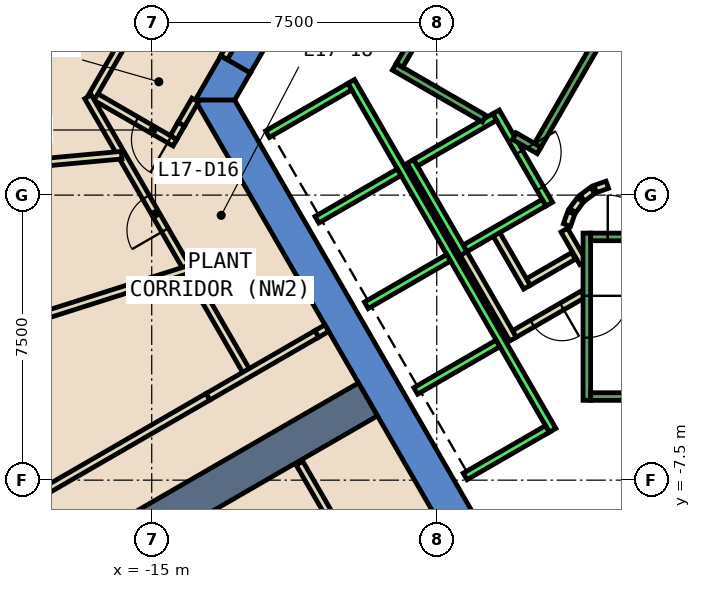
"""IFC4 building model, lengths in metres.
Left out: names, types, materials, properties, quantities, classifications, styles, units other than length and angle.
Written with IfcOpenShell. Run it as: python <this file> out.ifc"""

import sys

from ifc_helpers import new_model, si_unit, direction, frame, frame_2d, origin, place, context, subcontext, project, spatial, polyline, rectangle, outline, extrude, element, fill, save


model = new_model("IFC4")
c1 = context("Model", 3, precision=1e-05, world=origin(), true_north=direction((0.0, 1.0)))
c2 = subcontext(c1, "Body", "Model", "MODEL_VIEW")
j1 = project(units=[si_unit("LENGTHUNIT", "METRE"), si_unit("PLANEANGLEUNIT", "RADIAN")], contexts=[c1])
p1 = place(None, origin())
s1 = spatial("IfcSite", under=j1, at=p1, CompositionType="ELEMENT")
p2 = place(p1, origin())
s2 = spatial("IfcBuilding", under=s1, at=p2, CompositionType="ELEMENT")
p3 = place(p2, frame((0.0, 0.0, 81.2)))
s3 = spatial("IfcBuildingStorey", under=s2, at=p3, CompositionType="ELEMENT", Elevation=81.2)
p4 = place(p3, frame((0.0, 0.0, -0.6)))
e1 = element("IfcWall", 1, at=p4, inside=s3, PredefinedType="SHEAR", context=c2, shape_type="SweptSolid", body=[
    extrude(outline(polyline([(-12.403, 3.217), (-13.182, 3.667), (-13.856, 2.5), (-12.817, 2.5), (-12.403, 3.217)])), origin(), (0.0, 0.0, 1.0), 5.4),
])
p5 = place(p3, frame((0.0, 0.0, 3.6)))
e2 = element("IfcWall", 2, at=p5, inside=s3, PredefinedType="SHEAR", context=c2, shape_type="SweptSolid", body=[
    extrude(outline(polyline([(-13.182, 3.667), (-12.403, 3.217), (-11.488, 4.802), (-12.267, 5.252), (-13.182, 3.667)])), origin(), (0.0, 0.0, 1.0), 1.2),
])
p6 = place(p3, frame((0.0, 0.0, -0.6)))
e3 = element("IfcWall", 3, at=p6, inside=s3, PredefinedType="SHEAR", context=c2, shape_type="SweptSolid", body=[
    extrude(outline(polyline([(-13.856, 2.5), (-6.928, -9.5), (-6.409, -8.6), (-12.817, 2.5), (-13.856, 2.5)])), origin(), (0.0, 0.0, 1.0), 5.4),
])
p7 = place(p3, frame((-9.31, -5.375, 0.0), z_axis=(0.0, 0.0, 1.0), x_axis=(-0.866022967049, -0.500004220526, 0.0)))
e4 = element("IfcWall", 4, at=p7, inside=s3, PredefinedType="SHEAR", context=c2, shape_type="SweptSolid", body=[
    extrude(rectangle(XDim=35.802, YDim=1.0, at=frame_2d((17.901, 0.0))), origin(), (0.0, 0.0, 1.0), 4.8),
])
p8 = place(p3, frame((-3.9, -1.599, 0.0), z_axis=(0.0, 0.0, 1.0), x_axis=(-0.865969445389, -0.500096910261, 0.0)))
e5 = element("IfcWall", 5, at=p8, inside=s3, PredefinedType="PARTITIONING", context=c2, shape_type="SweptSolid", body=[
    extrude(rectangle(XDim=1.373, YDim=0.2, at=frame_2d((0.687, 0.0))), origin(), (0.0, 0.0, 1.0), 4.8),
])
p9 = place(p3, frame((-5.126, -2.422, 0.0), z_axis=(0.0, 0.0, 1.0), x_axis=(-0.500062241894, 0.865989465428, 0.0)))
e6 = element("IfcWall", 6, at=p9, inside=s3, PredefinedType="PARTITIONING", context=c2, shape_type="SweptSolid", body=[
    extrude(rectangle(XDim=1.7, YDim=0.2, at=frame_2d((0.85, 0.0))), origin(), (0.0, 0.0, 1.0), 4.8),
])
p10 = place(p3, frame((-5.492, -3.788, 0.0), z_axis=(0.0, 0.0, 1.0), x_axis=(-0.500008949224, 0.866020236886, 0.0)))
e7 = element("IfcWall", 7, at=p10, inside=s3, PredefinedType="PARTITIONING", context=c2, shape_type="SweptSolid", body=[
    extrude(rectangle(XDim=2.68, YDim=0.2, at=frame_2d((1.34, 0.0))), origin(), (0.0, 0.0, 1.0), 4.8),
])
p11 = place(p3, frame((-4.145, -0.92, 0.0), z_axis=(0.0, 0.0, 1.0), x_axis=(0.499743786207, -0.866173278362, 0.0)))
e8 = element("IfcWall", 8, at=p11, inside=s3, PredefinedType="PARTITIONING", context=c2, shape_type="SweptSolid", body=[
    extrude(rectangle(XDim=0.991, YDim=0.2, at=frame_2d((0.495, 0.0))), origin(), (0.0, 0.0, 1.0), 4.8),
])
p12 = place(p3, frame((-3.65, -2.61, 0.0), z_axis=(0.0, 0.0, 1.0), x_axis=(-0.866072462134, -0.499918483688, 0.0)))
e9 = element("IfcWall", 9, at=p12, inside=s3, PredefinedType="PARTITIONING", context=c2, shape_type="SweptSolid", body=[
    extrude(rectangle(XDim=2.084, YDim=0.2, at=frame_2d((1.042, 0.0))), origin(), (0.0, 0.0, 1.0), 4.8),
])
p13 = place(p12, frame((0.642, 0.0, 0.0)))
e10 = element("IfcOpeningElement", 10, at=p13, cuts=e9, PredefinedType="OPENING", context=c2, shape_type="SweptSolid", body=[
    extrude(rectangle(XDim=0.9, YDim=2.1, at=frame_2d((0.45, 1.05))), frame((0.0, 0.11, 0.0), z_axis=(0.0, -1.0, 0.0), x_axis=(1.0, 0.0, 0.0)), (0.0, 0.0, 1.0), 0.22),
])
p14 = place(p3, frame((-3.012, 0.273, 0.0), z_axis=(0.0, 0.0, 1.0), x_axis=(-0.942280615813, -0.334824194261, 0.0)))
e11 = element("IfcWall", 11, at=p14, inside=s3, PredefinedType="PARTITIONING", context=c2, shape_type="SweptSolid", body=[
    extrude(rectangle(XDim=0.338, YDim=0.2, at=frame_2d((0.169, 0.0))), origin(), (0.0, 0.0, 1.0), 4.8),
])
p15 = place(p3, frame((-3.397, 0.124, 0.0), z_axis=(0.0, 0.0, 1.0), x_axis=(-0.804311165252, -0.594208338422, 0.0)))
e12 = element("IfcWall", 12, at=p15, inside=s3, PredefinedType="PARTITIONING", context=c2, shape_type="SweptSolid", body=[
    extrude(rectangle(XDim=0.338, YDim=0.2, at=frame_2d((0.169, 0.0))), origin(), (0.0, 0.0, 1.0), 4.8),
])
p16 = place(p3, frame((-3.723, -0.131, 0.0), z_axis=(0.0, 0.0, 1.0), x_axis=(-0.594675113454, -0.803966112121, 0.0)))
e13 = element("IfcWall", 13, at=p16, inside=s3, PredefinedType="PARTITIONING", context=c2, shape_type="SweptSolid", body=[
    extrude(rectangle(XDim=0.338, YDim=0.2, at=frame_2d((0.169, 0.0))), origin(), (0.0, 0.0, 1.0), 4.8),
])
p17 = place(p3, frame((-3.96, -0.47, 0.0), z_axis=(0.0, 0.0, 1.0), x_axis=(-0.334824194261, -0.942280615813, 0.0)))
e14 = element("IfcWall", 14, at=p17, inside=s3, PredefinedType="PARTITIONING", context=c2, shape_type="SweptSolid", body=[
    extrude(rectangle(XDim=0.338, YDim=0.2, at=frame_2d((0.169, 0.0))), origin(), (0.0, 0.0, 1.0), 4.8),
])
p18 = place(p3, frame((-2.771, 4.7, 0.0), z_axis=(0.0, 0.0, 1.0), x_axis=(0.499969479948, -0.866043023828, 0.0)))
e15 = element("IfcWall", 15, at=p18, inside=s3, PredefinedType="PARTITIONING", context=c2, shape_type="SweptSolid", body=[
    extrude(rectangle(XDim=4.99, YDim=0.2, at=frame_2d((2.495, 0.0))), origin(), (0.0, 0.0, 1.0), 4.8),
])
p19 = place(p18, frame((1.945, 0.0, 0.0)))
e16 = element("IfcOpeningElement", 16, at=p19, cuts=e15, PredefinedType="OPENING", context=c2, shape_type="SweptSolid", body=[
    extrude(rectangle(XDim=1.0, YDim=2.1, at=frame_2d((0.5, 1.05))), frame((0.0, 0.11, 0.0), z_axis=(0.0, -1.0, 0.0), x_axis=(1.0, 0.0, 0.0)), (0.0, 0.0, 1.0), 0.22),
])
p20 = place(p3, frame((-8.264, -11.987, 0.0), z_axis=(0.0, 0.0, 1.0), x_axis=(-0.499907863044, 0.866078592546, 0.0)))
e17 = element("IfcWall", 17, at=p20, inside=s3, PredefinedType="PARTITIONING", context=c2, shape_type="SweptSolid", body=[
    extrude(rectangle(XDim=5.699, YDim=0.2, at=frame_2d((2.85, 0.0))), origin(), (0.0, 0.0, 1.0), 4.8),
])
p21 = place(p20, frame((1.419, 0.0, 0.0)))
e18 = element("IfcOpeningElement", 18, at=p21, cuts=e17, PredefinedType="OPENING", context=c2, shape_type="SweptSolid", body=[
    extrude(rectangle(XDim=1.0, YDim=2.1, at=frame_2d((0.5, 1.05))), frame((0.0, 0.11, 0.0), z_axis=(0.0, -1.0, 0.0), x_axis=(1.0, 0.0, 0.0)), (0.0, 0.0, 1.0), 0.22),
])
p22 = place(p3, frame((-10.392, -3.5, 0.0), z_axis=(0.0, 0.0, 1.0), x_axis=(-0.866040446274, -0.499973944738, 0.0)))
e19 = element("IfcWall", 19, at=p22, inside=s3, PredefinedType="PARTITIONING", context=c2, shape_type="SweptSolid", body=[
    extrude(rectangle(XDim=0.308, YDim=0.2, at=frame_2d((0.154, 0.0))), origin(), (0.0, 0.0, 1.0), 1.7),
])
p23 = place(p3, frame((-43.337, -22.52, 0.0), z_axis=(0.0, 0.0, 1.0), x_axis=(0.866035864772, 0.4999818806, 0.0)))
e20 = element("IfcWall", 20, at=p23, inside=s3, PredefinedType="PARTITIONING", context=c2, shape_type="SweptSolid", body=[
    extrude(rectangle(XDim=34.431, YDim=0.2, at=frame_2d((17.216, 0.0))), origin(), (0.0, 0.0, 1.0), 4.8),
])
p24 = place(p3, frame((-13.856, 2.501, 0.0), z_axis=(0.0, 0.0, 1.0), x_axis=(-0.500327511442, -0.865836232376, 0.0)))
e21 = element("IfcWall", 21, at=p24, inside=s3, PredefinedType="PARTITIONING", context=c2, shape_type="SweptSolid", body=[
    extrude(rectangle(XDim=0.733, YDim=0.2, at=frame_2d((0.367, 0.0))), origin(), (0.0, 0.0, 1.0), 4.8),
])
p25 = place(p3, frame((-14.388, 1.379, 0.0), z_axis=(0.0, 0.0, 1.0), x_axis=(-0.866022959057, 0.500004234368, 0.0)))
e22 = element("IfcWall", 22, at=p25, inside=s3, PredefinedType="PARTITIONING", context=c2, shape_type="SweptSolid", body=[
    extrude(rectangle(XDim=2.5, YDim=0.2, at=frame_2d((1.25, 0.0))), origin(), (0.0, 0.0, 1.0), 4.8),
])
p26 = place(p25, frame((0.168, 0.0, 0.0)))
e23 = element("IfcOpeningElement", 23, at=p26, cuts=e22, PredefinedType="OPENING", context=c2, shape_type="SweptSolid", body=[
    extrude(rectangle(XDim=1.0, YDim=2.1, at=frame_2d((0.5, 1.05))), frame((0.0, 0.11, 0.0), z_axis=(0.0, -1.0, 0.0), x_axis=(1.0, 0.0, 0.0)), (0.0, 0.0, 1.0), 0.22),
])
p27 = place(p3, frame((-16.603, 2.542, 0.0), z_axis=(0.0, 0.0, 1.0), x_axis=(0.499968011863, 0.866043871356, 0.0)))
e24 = element("IfcWall", 24, at=p27, inside=s3, PredefinedType="PARTITIONING", context=c2, shape_type="SweptSolid", body=[
    extrude(rectangle(XDim=7.201, YDim=0.2, at=frame_2d((3.6, 0.0))), origin(), (0.0, 0.0, 1.0), 4.8),
])
p28 = place(p27, frame((2.654, 0.0, 0.0)))
e25 = element("IfcOpeningElement", 25, at=p28, cuts=e24, PredefinedType="OPENING", context=c2, shape_type="SweptSolid", body=[
    extrude(rectangle(XDim=1.0, YDim=2.1, at=frame_2d((0.5, 1.05))), frame((0.0, 0.11, 0.0), z_axis=(0.0, -1.0, 0.0), x_axis=(1.0, 0.0, 0.0)), (0.0, 0.0, 1.0), 0.22),
])
p29 = place(p3, frame((-12.471, -4.7, 0.0), z_axis=(0.0, 0.0, 1.0), x_axis=(-0.49990916997, 0.866077838176, 0.0)))
e26 = element("IfcWall", 26, at=p29, inside=s3, PredefinedType="PARTITIONING", context=c2, shape_type="SweptSolid", body=[
    extrude(rectangle(XDim=8.414, YDim=0.2, at=frame_2d((4.207, 0.0))), origin(), (0.0, 0.0, 1.0), 4.8),
])
p30 = place(p29, frame((4.362, 0.0, 0.0)))
e27 = element("IfcOpeningElement", 27, at=p30, cuts=e26, PredefinedType="OPENING", context=c2, shape_type="SweptSolid", body=[
    extrude(rectangle(XDim=1.0, YDim=2.1, at=frame_2d((0.5, 1.05))), frame((0.0, 0.11, 0.0), z_axis=(0.0, -1.0, 0.0), x_axis=(1.0, 0.0, 0.0)), (0.0, 0.0, 1.0), 0.22),
])
p31 = place(p3, frame((-15.791, 1.051, 0.0), z_axis=(0.0, 0.0, 1.0), x_axis=(-0.99580964223, -0.091450294928, 0.0)))
e28 = element("IfcWall", 28, at=p31, inside=s3, PredefinedType="PARTITIONING", context=c2, shape_type="SweptSolid", body=[
    extrude(rectangle(XDim=18.557, YDim=0.2, at=frame_2d((9.278, 0.0))), origin(), (0.0, 0.0, 1.0), 2.4),
])
p32 = place(p3, frame((-14.051, -1.963, 0.0), z_axis=(0.0, 0.0, 1.0), x_axis=(-0.953071002878, -0.302746863687, 0.0)))
e29 = element("IfcWall", 29, at=p32, inside=s3, PredefinedType="PARTITIONING", context=c2, shape_type="SweptSolid", body=[
    extrude(rectangle(XDim=27.158, YDim=0.2, at=frame_2d((13.579, 0.0))), origin(), (0.0, 0.0, 1.0), 4.8),
])
p33 = place(p32, frame((13.05, 0.0, 0.0)))
e30 = element("IfcOpeningElement", 30, at=p33, cuts=e29, PredefinedType="OPENING", context=c2, shape_type="SweptSolid", body=[
    extrude(rectangle(XDim=1.0, YDim=2.1, at=frame_2d((0.5, 1.05))), frame((0.0, 0.11, 0.0), z_axis=(0.0, -1.0, 0.0), x_axis=(1.0, 0.0, 0.0)), (0.0, 0.0, 1.0), 0.22),
])
p34 = place(p3, frame((-12.181, 5.202, 0.0), z_axis=(0.0, 0.0, 1.0), x_axis=(-0.500215337403, -0.865901042976, 0.0)))
e31 = element("IfcWall", 31, at=p34, inside=s3, PredefinedType="PARTITIONING", context=c2, shape_type="SweptSolid", body=[
    extrude(rectangle(XDim=1.829, YDim=0.2, at=frame_2d((0.915, 0.0))), origin(), (0.0, 0.0, 1.0), 2.4),
])
p35 = place(p34, frame((0.415, 0.0, 0.0)))
e32 = element("IfcOpeningElement", 32, at=p35, cuts=e31, PredefinedType="OPENING", context=c2, shape_type="SweptSolid", body=[
    extrude(rectangle(XDim=1.0, YDim=2.1, at=frame_2d((0.5, 1.05))), frame((0.0, 0.11, 0.0), z_axis=(0.0, -1.0, 0.0), x_axis=(1.0, 0.0, 0.0)), (0.0, 0.0, 1.0), 0.22),
])
p36 = place(p3, frame((-10.659, -3.654, 0.0), z_axis=(0.0, 0.0, 1.0), x_axis=(-0.866004557827, -0.500036104519, 0.0)))
e33 = element("IfcWall", 33, at=p36, inside=s3, PredefinedType="PARTITIONING", context=c2, shape_type="SweptSolid", body=[
    extrude(rectangle(XDim=3.302, YDim=0.2, at=frame_2d((1.651, 0.0))), origin(), (0.0, 0.0, 1.0), 4.8),
])
p37 = place(p3, frame((-14.223, 1.866, 0.0), z_axis=(0.0, 0.0, 1.0), x_axis=(-0.500297731093, -0.865853440406, 0.0)))
e34 = element("IfcWall", 34, at=p37, inside=s3, PredefinedType="PARTITIONING", context=c2, shape_type="SweptSolid", body=[
    extrude(rectangle(XDim=0.404, YDim=0.2, at=frame_2d((0.202, 0.0))), origin(), (0.0, 0.0, 1.0), 2.4),
])
p38 = place(p3, frame((-5.94, 2.188, 0.0), z_axis=(0.0, 0.0, 1.0), x_axis=(0.49994636267, -0.866056369097, 0.0)))
e35 = element("IfcWall", 35, at=p38, inside=s3, PredefinedType="STANDARD", context=c2, shape_type="SweptSolid", body=[
    extrude(rectangle(XDim=2.8, YDim=0.2, at=frame_2d((1.4, 0.0))), origin(), (0.0, 0.0, 1.0), 4.8),
])
p39 = place(p38, frame((1.225, 0.0, 0.0)))
e36 = element("IfcOpeningElement", 36, at=p39, cuts=e35, PredefinedType="OPENING", context=c2, shape_type="SweptSolid", body=[
    extrude(rectangle(XDim=1.1, YDim=2.1, at=frame_2d((0.55, 1.05))), frame((0.0, 0.11, 0.0), z_axis=(0.0, -1.0, 0.0), x_axis=(1.0, 0.0, 0.0)), (0.0, 0.0, 1.0), 0.22),
])
p40 = place(p3, frame((-8.192, 0.888, 0.0), z_axis=(0.0, 0.0, 1.0), x_axis=(0.49994636267, -0.866056369097, 0.0)))
e37 = element("IfcWall", 37, at=p40, inside=s3, PredefinedType="STANDARD", context=c2, shape_type="SweptSolid", body=[
    extrude(rectangle(XDim=2.8, YDim=0.2, at=frame_2d((1.4, 0.0))), origin(), (0.0, 0.0, 1.0), 4.8),
])
for number, where, z_axis, x_axis in (
    (38, (-5.977, 2.052, 0.0), (0.0, 0.0, 1.0), (-0.866, -0.5, 0.0)),
    (39, (-4.677, -0.2, 0.0), (0.0, 0.0, 1.0), (-0.866, -0.5, 0.0)),
):
    element("IfcWall", number, at=place(p3, frame(where, z_axis=z_axis, x_axis=x_axis)), inside=s3, PredefinedType="STANDARD", context=c2, shape_type="SweptSolid", body=[
        extrude(rectangle(XDim=2.399, YDim=0.2, at=frame_2d((1.2, 0.0))), origin(), (0.0, 0.0, 1.0), 4.8),
    ])
p41 = place(p3, frame((-9.751, 2.99, 0.0), z_axis=(0.0, 0.0, 1.0), x_axis=(0.50000090737, -0.866024879913, 0.0)))
e40 = element("IfcWall", 40, at=p41, inside=s3, PredefinedType="STANDARD", context=c2, shape_type="SweptSolid", body=[
    extrude(rectangle(XDim=10.6, YDim=0.2, at=frame_2d((5.3, 0.0))), origin(), (0.0, 0.0, 1.0), 4.8),
])
p42 = place(p3, frame((-9.788, 2.853, 0.0), z_axis=(0.0, 0.0, 1.0), x_axis=(-0.865998541277, -0.500046524342, 0.0)))
e41 = element("IfcWall", 41, at=p42, inside=s3, PredefinedType="STANDARD", context=c2, shape_type="SweptSolid", body=[
    extrude(rectangle(XDim=2.5, YDim=0.2, at=frame_2d((1.25, 0.0))), origin(), (0.0, 0.0, 1.0), 4.8),
])
for number, where, z_axis, x_axis in (
    (42, (-8.488, 0.602, 0.0), (0.0, 0.0, 1.0), (-0.866, -0.5, 0.0)),
    (43, (-7.188, -1.65, 0.0), (0.0, 0.0, 1.0), (-0.866, -0.5, 0.0)),
    (44, (-5.888, -3.902, 0.0), (0.0, 0.0, 1.0), (-0.866, -0.5, 0.0)),
    (45, (-4.588, -6.153, 0.0), (0.0, 0.0, 1.0), (-0.866, -0.5, 0.0)),
):
    element("IfcWall", number, at=place(p3, frame(where, z_axis=z_axis, x_axis=x_axis)), inside=s3, PredefinedType="STANDARD", context=c2, shape_type="SweptSolid", body=[
        extrude(rectangle(XDim=2.5, YDim=0.2, at=frame_2d((1.25, 0.0))), origin(), (0.0, 0.0, 1.0), 4.8),
    ])
p43 = place(p3, frame((-3.55, -1.0, 0.0), z_axis=(0.0, 0.0, 1.0), x_axis=(0.0, -1.0, 0.0)))
e46 = element("IfcWall", 46, at=p43, inside=s3, PredefinedType="STANDARD", context=c2, shape_type="SweptSolid", body=[
    extrude(rectangle(XDim=4.4, YDim=0.2, at=frame_2d((2.2, 0.0))), origin(), (0.0, 0.0, 1.0), 4.8),
])
p44 = place(p43, frame((1.65, 0.0, 0.0)))
e47 = element("IfcOpeningElement", 47, at=p44, cuts=e46, PredefinedType="OPENING", context=c2, shape_type="SweptSolid", body=[
    extrude(rectangle(XDim=1.1, YDim=2.2, at=frame_2d((0.55, 1.1))), frame((0.0, 0.11, 0.0), z_axis=(0.0, -1.0, 0.0), x_axis=(1.0, 0.0, 0.0)), (0.0, 0.0, 1.0), 0.22),
])
p45 = place(p3, frame((-3.45, -1.1, 0.0), z_axis=(0.0, 0.0, 1.0), x_axis=(1.0, 0.0, 0.0)))
e48 = element("IfcWall", 48, at=p45, inside=s3, PredefinedType="STANDARD", context=c2, shape_type="SweptSolid", body=[
    extrude(rectangle(XDim=6.9, YDim=0.2, at=frame_2d((3.45, 0.0))), origin(), (0.0, 0.0, 1.0), 4.8),
])
p46 = place(p45, frame((0.45, 0.0, 0.0)))
e49 = element("IfcOpeningElement", 49, at=p46, cuts=e48, PredefinedType="OPENING", context=c2, shape_type="SweptSolid", body=[
    extrude(rectangle(XDim=1.1, YDim=2.2, at=frame_2d((0.55, 1.1))), frame((0.0, 0.11, 0.0), z_axis=(0.0, -1.0, 0.0), x_axis=(1.0, 0.0, 0.0)), (0.0, 0.0, 1.0), 0.22),
])
p47 = place(p3, frame((-3.45, -5.3, 0.0), z_axis=(0.0, 0.0, 1.0), x_axis=(1.0, 0.0, 0.0)))
e50 = element("IfcWall", 50, at=p47, inside=s3, PredefinedType="STANDARD", context=c2, shape_type="SweptSolid", body=[
    extrude(rectangle(XDim=6.9, YDim=0.2, at=frame_2d((3.45, 0.0))), origin(), (0.0, 0.0, 1.0), 4.8),
])
p48 = place(p3, frame((-6.25, 2.01, 0.0), z_axis=(0.0, 0.0, 1.0), x_axis=(-0.86611865017, 0.499838457731, 0.0)))
e51 = element("IfcWall", 51, at=p48, inside=s3, PredefinedType="STANDARD", context=c2, shape_type="SweptSolid", body=[
    extrude(rectangle(XDim=2.733, YDim=0.2, at=frame_2d((1.366, 0.0))), origin(), (0.0, 0.0, 1.0), 4.8),
])
p49 = place(p3, frame((-4.806, 1.176, 0.0), z_axis=(0.0, 0.0, 1.0), x_axis=(-0.866558586415, 0.499075361355, 0.0)))
e52 = element("IfcWall", 52, at=p49, inside=s3, PredefinedType="STANDARD", context=c2, shape_type="SweptSolid", body=[
    extrude(rectangle(XDim=0.751, YDim=0.2, at=frame_2d((0.376, 0.0))), origin(), (0.0, 0.0, 1.0), 4.8),
])
p50 = place(p3, frame((-1.393, 7.288, 0.0), z_axis=(0.0, 0.0, 1.0), x_axis=(-0.499963383562, -0.866046543262, 0.0)))
e53 = element("IfcWall", 53, at=p50, inside=s3, PredefinedType="STANDARD", context=c2, shape_type="SweptSolid", body=[
    extrude(rectangle(XDim=6.9, YDim=0.2, at=frame_2d((3.45, 0.0))), origin(), (0.0, 0.0, 1.0), 4.8),
])
p51 = place(p50, frame((0.45, 0.0, 0.0)))
e54 = element("IfcOpeningElement", 54, at=p51, cuts=e53, PredefinedType="OPENING", context=c2, shape_type="SweptSolid", body=[
    extrude(rectangle(XDim=1.1, YDim=2.2, at=frame_2d((0.55, 1.1))), frame((0.0, 0.11, 0.0), z_axis=(0.0, -1.0, 0.0), x_axis=(1.0, 0.0, 0.0)), (0.0, 0.0, 1.0), 0.22),
])
p52 = place(p3, frame((-5.03, 9.388, 0.0), z_axis=(0.0, 0.0, 1.0), x_axis=(-0.499978703459, -0.866037698999, 0.0)))
e55 = element("IfcWall", 55, at=p52, inside=s3, PredefinedType="STANDARD", context=c2, shape_type="SweptSolid", body=[
    extrude(rectangle(XDim=6.9, YDim=0.2, at=frame_2d((3.45, 0.0))), origin(), (0.0, 0.0, 1.0), 4.8),
])
p53 = place(p26, origin())
e56 = element("IfcDoor", 56, at=p53, inside=s3, OperationType="SINGLE_SWING_LEFT", PredefinedType="DOOR", context=c2, shape_type="SweptSolid", body=[
    extrude(rectangle(XDim=1.0, YDim=2.1, at=frame_2d((0.5, 1.05))), frame((0.0, 0.025, 0.0), z_axis=(0.0, -1.0, 0.0), x_axis=(1.0, 0.0, 0.0)), (0.0, 0.0, 1.0), 0.05),
])
fill(e23, e56)
p54 = place(p30, origin())
e57 = element("IfcDoor", 57, at=p54, inside=s3, OperationType="SINGLE_SWING_RIGHT", PredefinedType="DOOR", context=c2, shape_type="SweptSolid", body=[
    extrude(rectangle(XDim=1.0, YDim=2.1, at=frame_2d((0.5, 1.05))), frame((0.0, 0.025, 0.0), z_axis=(0.0, -1.0, 0.0), x_axis=(1.0, 0.0, 0.0)), (0.0, 0.0, 1.0), 0.05),
])
fill(e27, e57)
p55 = place(p13, origin())
e58 = element("IfcDoor", 58, at=p55, inside=s3, OperationType="SINGLE_SWING_LEFT", PredefinedType="DOOR", context=c2, shape_type="SweptSolid", body=[
    extrude(rectangle(XDim=0.9, YDim=2.1, at=frame_2d((0.45, 1.05))), frame((0.0, 0.025, 0.0), z_axis=(0.0, -1.0, 0.0), x_axis=(1.0, 0.0, 0.0)), (0.0, 0.0, 1.0), 0.05),
])
fill(e10, e58)
p56 = place(p39, origin())
e59 = element("IfcDoor", 59, at=p56, inside=s3, OperationType="SLIDING_TO_LEFT", PredefinedType="DOOR", context=c2, shape_type="SweptSolid", body=[
    extrude(rectangle(XDim=1.1, YDim=2.1, at=frame_2d((0.55, 1.05))), frame((0.0, 0.025, 0.0), z_axis=(0.0, -1.0, 0.0), x_axis=(1.0, 0.0, 0.0)), (0.0, 0.0, 1.0), 0.05),
])
fill(e36, e59)
p57 = place(p46, origin())
e60 = element("IfcDoor", 60, at=p57, inside=s3, OperationType="SINGLE_SWING_LEFT", PredefinedType="DOOR", context=c2, shape_type="SweptSolid", body=[
    extrude(rectangle(XDim=1.1, YDim=2.2, at=frame_2d((0.55, 1.1))), frame((0.0, 0.025, 0.0), z_axis=(0.0, -1.0, 0.0), x_axis=(1.0, 0.0, 0.0)), (0.0, 0.0, 1.0), 0.05),
])
fill(e49, e60)
p58 = place(p44, origin())
e61 = element("IfcDoor", 61, at=p58, inside=s3, OperationType="SINGLE_SWING_LEFT", PredefinedType="DOOR", context=c2, shape_type="SweptSolid", body=[
    extrude(rectangle(XDim=1.1, YDim=2.2, at=frame_2d((0.55, 1.1))), frame((0.0, 0.025, 0.0), z_axis=(0.0, -1.0, 0.0), x_axis=(1.0, 0.0, 0.0)), (0.0, 0.0, 1.0), 0.05),
])
fill(e47, e61)
save(model, sys.argv[1])
